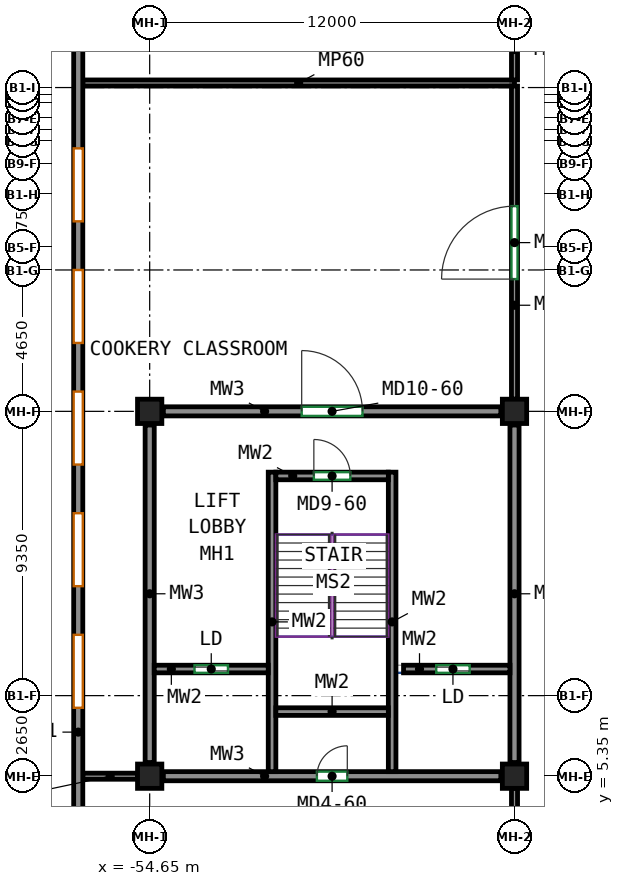
"""IFC4 building model, lengths in metres.
Left out: names, types, materials, properties, quantities, classifications, styles, units other than length and angle.
Written with IfcOpenShell. Run it as: python <this file> out.ifc"""

import sys

from ifc_helpers import new_model, si_unit, direction, frame, frame_2d, origin, origin_2d, place, context, subcontext, project, spatial, rectangle, extrude, source, transform, mapped, element, fill, save


model = new_model("IFC4")
c1 = context("Model", 3, precision=1e-05, world=origin(), true_north=direction((0.0, 1.0)))
c2 = subcontext(c1, "Body", "Model", "MODEL_VIEW")
j1 = project(units=[si_unit("LENGTHUNIT", "METRE"), si_unit("PLANEANGLEUNIT", "RADIAN")], contexts=[c1])
p1 = place(None, origin())
s1 = spatial("IfcSite", under=j1, at=p1, CompositionType="ELEMENT")
p2 = place(p1, origin())
s2 = spatial("IfcBuilding", under=s1, at=p2, CompositionType="ELEMENT")
p3 = place(p2, frame((0.0, 0.0, 13.5)))
s3 = spatial("IfcBuildingStorey", under=s2, at=p3, CompositionType="ELEMENT", Elevation=13.5)
m1 = source(origin(), c2, "Body", "SweptSolid", [
    extrude(rectangle(XDim=0.8, YDim=0.8, at=origin_2d()), origin(), (0.0, 0.0, 1.0), 4.1),
])
for number, where, z_axis, x_axis in (
    (1, (-54.65, 5.35, 0.0), (0.0, 0.0, 1.0), (1.0, 0.0, 0.0)),
    (2, (-54.65, 17.35, 0.0), (0.0, 0.0, 1.0), (1.0, 0.0, 0.0)),
    (3, (-42.65, 5.35, 0.0), (0.0, 0.0, 1.0), (1.0, 0.0, 0.0)),
    (4, (-42.65, 17.35, 0.0), (0.0, 0.0, 1.0), (1.0, 0.0, 0.0)),
):
    element("IfcColumn", number, at=place(p3, frame(where, z_axis=z_axis, x_axis=x_axis)), inside=s3, PredefinedType="COLUMN", context=c2, shape_type="MappedRepresentation", body=[
        mapped(m1, transform((0.0, 0.0, 0.0))),
    ])
m2 = source(origin(), c2, "Body", "SweptSolid", [
    extrude(rectangle(XDim=11.1, YDim=0.3, at=frame_2d((5.55, 0.0))), origin(), (0.0, 0.0, 1.0), 3.3),
])
p4 = place(p3, frame((-54.2, 5.35, 0.0), z_axis=(0.0, 0.0, 1.0), x_axis=(1.0, 0.0, 0.0)))
e5 = element("IfcWall", 5, at=p4, inside=s3, PredefinedType="SHEAR", context=c2, shape_type="MappedRepresentation", body=[
    mapped(m2, transform((0.0, 0.0, 0.0))),
])
p5 = place(p4, frame((5.05, 0.0, 0.0)))
e6 = element("IfcOpeningElement", 6, at=p5, cuts=e5, PredefinedType="OPENING", context=c2, shape_type="SweptSolid", body=[
    extrude(rectangle(XDim=1.0, YDim=2.1, at=frame_2d((0.5, 1.05))), frame((0.0, 0.16, 0.0), z_axis=(0.0, -1.0, 0.0), x_axis=(1.0, 0.0, 0.0)), (0.0, 0.0, 1.0), 0.32),
])
p6 = place(p3, frame((-54.2, 17.35, 0.0), z_axis=(0.0, 0.0, 1.0), x_axis=(1.0, 0.0, 0.0)))
e7 = element("IfcWall", 7, at=p6, inside=s3, PredefinedType="SHEAR", context=c2, shape_type="MappedRepresentation", body=[
    mapped(m2, transform((0.0, 0.0, 0.0))),
])
p7 = place(p6, frame((4.55, 0.0, 0.0)))
e8 = element("IfcOpeningElement", 8, at=p7, cuts=e7, PredefinedType="OPENING", context=c2, shape_type="SweptSolid", body=[
    extrude(rectangle(XDim=2.0, YDim=2.4, at=frame_2d((1.0, 1.2))), frame((0.0, 0.16, 0.0), z_axis=(0.0, -1.0, 0.0), x_axis=(1.0, 0.0, 0.0)), (0.0, 0.0, 1.0), 0.32),
])
for number, where, z_axis, x_axis in (
    (9, (-54.65, 5.8, 0.0), (0.0, 0.0, 1.0), (0.0, 1.0, 0.0)),
    (10, (-42.65, 5.8, 0.0), (0.0, 0.0, 1.0), (0.0, 1.0, 0.0)),
):
    element("IfcWall", number, at=place(p3, frame(where, z_axis=z_axis, x_axis=x_axis)), inside=s3, PredefinedType="SHEAR", context=c2, shape_type="MappedRepresentation", body=[
        mapped(m2, transform((0.0, 0.0, 0.0))),
    ])
m3 = source(origin(), c2, "Body", "SweptSolid", [
    extrude(rectangle(XDim=9.85, YDim=0.25, at=frame_2d((4.925, 0.0))), origin(), (0.0, 0.0, 1.0), 4.1),
])
for number, where, z_axis, x_axis in (
    (11, (-50.625, 5.5, 0.0), (0.0, 0.0, 1.0), (0.0, 1.0, 0.0)),
    (12, (-46.675, 5.5, 0.0), (0.0, 0.0, 1.0), (0.0, 1.0, 0.0)),
):
    element("IfcWall", number, at=place(p3, frame(where, z_axis=z_axis, x_axis=x_axis)), inside=s3, PredefinedType="SHEAR", context=c2, shape_type="MappedRepresentation", body=[
        mapped(m3, transform((0.0, 0.0, 0.0))),
    ])
m4 = source(origin(), c2, "Body", "SweptSolid", [
    extrude(rectangle(XDim=3.7, YDim=0.25, at=frame_2d((1.85, 0.0))), origin(), (0.0, 0.0, 1.0), 4.1),
])
p8 = place(p3, frame((-50.5, 7.475, 0.0), z_axis=(0.0, 0.0, 1.0), x_axis=(1.0, 0.0, 0.0)))
e13 = element("IfcWall", 13, at=p8, inside=s3, PredefinedType="SHEAR", context=c2, shape_type="MappedRepresentation", body=[
    mapped(m4, transform((0.0, 0.0, 0.0))),
])
p9 = place(p3, frame((-50.5, 15.225, 0.0), z_axis=(0.0, 0.0, 1.0), x_axis=(1.0, 0.0, 0.0)))
e14 = element("IfcWall", 14, at=p9, inside=s3, PredefinedType="SHEAR", context=c2, shape_type="MappedRepresentation", body=[
    mapped(m4, transform((0.0, 0.0, 0.0))),
])
p10 = place(p9, frame((1.25, 0.0, 0.0)))
e15 = element("IfcOpeningElement", 15, at=p10, cuts=e14, PredefinedType="OPENING", context=c2, shape_type="SweptSolid", body=[
    extrude(rectangle(XDim=1.2, YDim=2.1, at=frame_2d((0.6, 1.05))), frame((0.0, 0.135, 0.0), z_axis=(0.0, -1.0, 0.0), x_axis=(1.0, 0.0, 0.0)), (0.0, 0.0, 1.0), 0.27),
])
m5 = source(origin(), c2, "Body", "SweptSolid", [
    extrude(rectangle(XDim=3.75, YDim=0.25, at=frame_2d((1.875, 0.0))), origin(), (0.0, 0.0, 1.0), 4.1),
])
p11 = place(p3, frame((-54.5, 8.875, 0.0), z_axis=(0.0, 0.0, 1.0), x_axis=(1.0, 0.0, 0.0)))
e16 = element("IfcWall", 16, at=p11, inside=s3, PredefinedType="SHEAR", context=c2, shape_type="MappedRepresentation", body=[
    mapped(m5, transform((0.0, 0.0, 0.0))),
])
p12 = place(p11, frame((1.325, 0.0, 0.0)))
e17 = element("IfcOpeningElement", 17, at=p12, cuts=e16, PredefinedType="OPENING", context=c2, shape_type="SweptSolid", body=[
    extrude(rectangle(XDim=1.1, YDim=2.1, at=frame_2d((0.55, 1.05))), frame((0.0, 0.135, 0.0), z_axis=(0.0, -1.0, 0.0), x_axis=(1.0, 0.0, 0.0)), (0.0, 0.0, 1.0), 0.27),
])
m6 = source(origin(), c2, "Body", "SweptSolid", [
    extrude(rectangle(XDim=3.5, YDim=0.25, at=frame_2d((1.75, 0.0))), origin(), (0.0, 0.0, 1.0), 4.1),
])
p13 = place(p3, frame((-46.3, 8.875, 0.0), z_axis=(0.0, 0.0, 1.0), x_axis=(1.0, 0.0, 0.0)))
e18 = element("IfcWall", 18, at=p13, inside=s3, PredefinedType="SHEAR", context=c2, shape_type="MappedRepresentation", body=[
    mapped(m6, transform((0.0, 0.0, 0.0))),
])
p14 = place(p13, frame((1.075, 0.0, 0.0)))
e19 = element("IfcOpeningElement", 19, at=p14, cuts=e18, PredefinedType="OPENING", context=c2, shape_type="SweptSolid", body=[
    extrude(rectangle(XDim=1.1, YDim=2.1, at=frame_2d((0.55, 1.05))), frame((0.0, 0.135, 0.0), z_axis=(0.0, -1.0, 0.0), x_axis=(1.0, 0.0, 0.0)), (0.0, 0.0, 1.0), 0.27),
])
m7 = source(origin(), c2, "Body", "SweptSolid", [
    extrude(rectangle(XDim=100.7, YDim=0.3, at=frame_2d((50.35, 0.0))), origin(), (0.0, 0.0, 1.0), 4.1),
])
p15 = place(p3, frame((-57.0, -43.55, 0.0), z_axis=(0.0, 0.0, 1.0), x_axis=(0.0, 1.0, 0.0)))
e20 = element("IfcWall", 20, at=p15, inside=s3, PredefinedType="SOLIDWALL", context=c2, shape_type="MappedRepresentation", body=[
    mapped(m7, transform((0.0, 0.0, 0.0))),
])
p16 = place(p15, frame((3.15, 0.0, 0.9)))
e21 = element("IfcOpeningElement", 21, at=p16, cuts=e20, PredefinedType="OPENING", context=c2, shape_type="SweptSolid", body=[
    extrude(rectangle(XDim=2.4, YDim=1.8, at=frame_2d((1.2, 0.9))), frame((0.0, 0.16, 0.0), z_axis=(0.0, -1.0, 0.0), x_axis=(1.0, 0.0, 0.0)), (0.0, 0.0, 1.0), 0.32),
])
p17 = place(p15, frame((7.15, 0.0, 0.9)))
e22 = element("IfcOpeningElement", 22, at=p17, cuts=e20, PredefinedType="OPENING", context=c2, shape_type="SweptSolid", body=[
    extrude(rectangle(XDim=2.4, YDim=1.8, at=frame_2d((1.2, 0.9))), frame((0.0, 0.16, 0.0), z_axis=(0.0, -1.0, 0.0), x_axis=(1.0, 0.0, 0.0)), (0.0, 0.0, 1.0), 0.32),
])
p18 = place(p15, frame((11.15, 0.0, 0.9)))
e23 = element("IfcOpeningElement", 23, at=p18, cuts=e20, PredefinedType="OPENING", context=c2, shape_type="SweptSolid", body=[
    extrude(rectangle(XDim=2.4, YDim=1.8, at=frame_2d((1.2, 0.9))), frame((0.0, 0.16, 0.0), z_axis=(0.0, -1.0, 0.0), x_axis=(1.0, 0.0, 0.0)), (0.0, 0.0, 1.0), 0.32),
])
p19 = place(p15, frame((19.15, 0.0, 0.9)))
e24 = element("IfcOpeningElement", 24, at=p19, cuts=e20, PredefinedType="OPENING", context=c2, shape_type="SweptSolid", body=[
    extrude(rectangle(XDim=2.4, YDim=1.8, at=frame_2d((1.2, 0.9))), frame((0.0, 0.16, 0.0), z_axis=(0.0, -1.0, 0.0), x_axis=(1.0, 0.0, 0.0)), (0.0, 0.0, 1.0), 0.32),
])
p20 = place(p15, frame((23.15, 0.0, 0.9)))
e25 = element("IfcOpeningElement", 25, at=p20, cuts=e20, PredefinedType="OPENING", context=c2, shape_type="SweptSolid", body=[
    extrude(rectangle(XDim=2.4, YDim=1.8, at=frame_2d((1.2, 0.9))), frame((0.0, 0.16, 0.0), z_axis=(0.0, -1.0, 0.0), x_axis=(1.0, 0.0, 0.0)), (0.0, 0.0, 1.0), 0.32),
])
p21 = place(p15, frame((27.15, 0.0, 0.9)))
e26 = element("IfcOpeningElement", 26, at=p21, cuts=e20, PredefinedType="OPENING", context=c2, shape_type="SweptSolid", body=[
    extrude(rectangle(XDim=2.4, YDim=1.8, at=frame_2d((1.2, 0.9))), frame((0.0, 0.16, 0.0), z_axis=(0.0, -1.0, 0.0), x_axis=(1.0, 0.0, 0.0)), (0.0, 0.0, 1.0), 0.32),
])
p22 = place(p15, frame((31.15, 0.0, 0.9)))
e27 = element("IfcOpeningElement", 27, at=p22, cuts=e20, PredefinedType="OPENING", context=c2, shape_type="SweptSolid", body=[
    extrude(rectangle(XDim=2.4, YDim=1.8, at=frame_2d((1.2, 0.9))), frame((0.0, 0.16, 0.0), z_axis=(0.0, -1.0, 0.0), x_axis=(1.0, 0.0, 0.0)), (0.0, 0.0, 1.0), 0.32),
])
p23 = place(p15, frame((39.15, 0.0, 0.9)))
e28 = element("IfcOpeningElement", 28, at=p23, cuts=e20, PredefinedType="OPENING", context=c2, shape_type="SweptSolid", body=[
    extrude(rectangle(XDim=2.4, YDim=1.8, at=frame_2d((1.2, 0.9))), frame((0.0, 0.16, 0.0), z_axis=(0.0, -1.0, 0.0), x_axis=(1.0, 0.0, 0.0)), (0.0, 0.0, 1.0), 0.32),
])
p24 = place(p15, frame((43.15, 0.0, 0.9)))
e29 = element("IfcOpeningElement", 29, at=p24, cuts=e20, PredefinedType="OPENING", context=c2, shape_type="SweptSolid", body=[
    extrude(rectangle(XDim=2.4, YDim=1.8, at=frame_2d((1.2, 0.9))), frame((0.0, 0.16, 0.0), z_axis=(0.0, -1.0, 0.0), x_axis=(1.0, 0.0, 0.0)), (0.0, 0.0, 1.0), 0.32),
])
p25 = place(p15, frame((51.15, 0.0, 0.9)))
e30 = element("IfcOpeningElement", 30, at=p25, cuts=e20, PredefinedType="OPENING", context=c2, shape_type="SweptSolid", body=[
    extrude(rectangle(XDim=2.4, YDim=1.8, at=frame_2d((1.2, 0.9))), frame((0.0, 0.16, 0.0), z_axis=(0.0, -1.0, 0.0), x_axis=(1.0, 0.0, 0.0)), (0.0, 0.0, 1.0), 0.32),
])
p26 = place(p15, frame((55.15, 0.0, 0.9)))
e31 = element("IfcOpeningElement", 31, at=p26, cuts=e20, PredefinedType="OPENING", context=c2, shape_type="SweptSolid", body=[
    extrude(rectangle(XDim=2.4, YDim=1.8, at=frame_2d((1.2, 0.9))), frame((0.0, 0.16, 0.0), z_axis=(0.0, -1.0, 0.0), x_axis=(1.0, 0.0, 0.0)), (0.0, 0.0, 1.0), 0.32),
])
p27 = place(p15, frame((59.15, 0.0, 0.9)))
e32 = element("IfcOpeningElement", 32, at=p27, cuts=e20, PredefinedType="OPENING", context=c2, shape_type="SweptSolid", body=[
    extrude(rectangle(XDim=2.4, YDim=1.8, at=frame_2d((1.2, 0.9))), frame((0.0, 0.16, 0.0), z_axis=(0.0, -1.0, 0.0), x_axis=(1.0, 0.0, 0.0)), (0.0, 0.0, 1.0), 0.32),
])
p28 = place(p15, frame((63.15, 0.0, 0.9)))
e33 = element("IfcOpeningElement", 33, at=p28, cuts=e20, PredefinedType="OPENING", context=c2, shape_type="SweptSolid", body=[
    extrude(rectangle(XDim=2.4, YDim=1.8, at=frame_2d((1.2, 0.9))), frame((0.0, 0.16, 0.0), z_axis=(0.0, -1.0, 0.0), x_axis=(1.0, 0.0, 0.0)), (0.0, 0.0, 1.0), 0.32),
])
p29 = place(p15, frame((67.15, 0.0, 0.9)))
e34 = element("IfcOpeningElement", 34, at=p29, cuts=e20, PredefinedType="OPENING", context=c2, shape_type="SweptSolid", body=[
    extrude(rectangle(XDim=2.4, YDim=1.8, at=frame_2d((1.2, 0.9))), frame((0.0, 0.16, 0.0), z_axis=(0.0, -1.0, 0.0), x_axis=(1.0, 0.0, 0.0)), (0.0, 0.0, 1.0), 0.32),
])
p30 = place(p15, frame((75.15, 0.0, 0.9)))
e35 = element("IfcOpeningElement", 35, at=p30, cuts=e20, PredefinedType="OPENING", context=c2, shape_type="SweptSolid", body=[
    extrude(rectangle(XDim=2.4, YDim=1.8, at=frame_2d((1.2, 0.9))), frame((0.0, 0.16, 0.0), z_axis=(0.0, -1.0, 0.0), x_axis=(1.0, 0.0, 0.0)), (0.0, 0.0, 1.0), 0.32),
])
p31 = place(p15, frame((79.15, 0.0, 0.9)))
e36 = element("IfcOpeningElement", 36, at=p31, cuts=e20, PredefinedType="OPENING", context=c2, shape_type="SweptSolid", body=[
    extrude(rectangle(XDim=2.4, YDim=1.8, at=frame_2d((1.2, 0.9))), frame((0.0, 0.16, 0.0), z_axis=(0.0, -1.0, 0.0), x_axis=(1.0, 0.0, 0.0)), (0.0, 0.0, 1.0), 0.32),
])
p32 = place(p15, frame((83.15, 0.0, 0.9)))
e37 = element("IfcOpeningElement", 37, at=p32, cuts=e20, PredefinedType="OPENING", context=c2, shape_type="SweptSolid", body=[
    extrude(rectangle(XDim=2.4, YDim=1.8, at=frame_2d((1.2, 0.9))), frame((0.0, 0.16, 0.0), z_axis=(0.0, -1.0, 0.0), x_axis=(1.0, 0.0, 0.0)), (0.0, 0.0, 1.0), 0.32),
])
p33 = place(p15, frame((87.15, 0.0, 0.9)))
e38 = element("IfcOpeningElement", 38, at=p33, cuts=e20, PredefinedType="OPENING", context=c2, shape_type="SweptSolid", body=[
    extrude(rectangle(XDim=2.4, YDim=1.8, at=frame_2d((1.2, 0.9))), frame((0.0, 0.16, 0.0), z_axis=(0.0, -1.0, 0.0), x_axis=(1.0, 0.0, 0.0)), (0.0, 0.0, 1.0), 0.32),
])
p34 = place(p15, frame((91.15, 0.0, 0.9)))
e39 = element("IfcOpeningElement", 39, at=p34, cuts=e20, PredefinedType="OPENING", context=c2, shape_type="SweptSolid", body=[
    extrude(rectangle(XDim=2.4, YDim=1.8, at=frame_2d((1.2, 0.9))), frame((0.0, 0.16, 0.0), z_axis=(0.0, -1.0, 0.0), x_axis=(1.0, 0.0, 0.0)), (0.0, 0.0, 1.0), 0.32),
])
p35 = place(p15, frame((95.15, 0.0, 0.9)))
e40 = element("IfcOpeningElement", 40, at=p35, cuts=e20, PredefinedType="OPENING", context=c2, shape_type="SweptSolid", body=[
    extrude(rectangle(XDim=2.4, YDim=1.8, at=frame_2d((1.2, 0.9))), frame((0.0, 0.16, 0.0), z_axis=(0.0, -1.0, 0.0), x_axis=(1.0, 0.0, 0.0)), (0.0, 0.0, 1.0), 0.32),
])
m8 = source(origin(), c2, "Body", "SweptSolid", [
    extrude(rectangle(XDim=1.8, YDim=0.2, at=frame_2d((0.9, 0.0))), origin(), (0.0, 0.0, 1.0), 4.1),
])
p36 = place(p3, frame((-56.85, 5.35, 0.0), z_axis=(0.0, 0.0, 1.0), x_axis=(1.0, 0.0, 0.0)))
e41 = element("IfcWall", 41, at=p36, inside=s3, PredefinedType="PARTITIONING", context=c2, shape_type="MappedRepresentation", body=[
    mapped(m8, transform((0.0, 0.0, 0.0))),
])
m9 = source(origin(), c2, "Body", "SweptSolid", [
    extrude(rectangle(XDim=14.2, YDim=0.2, at=frame_2d((7.1, 0.0))), origin(), (0.0, 0.0, 1.0), 3.3),
])
p37 = place(p3, frame((-56.85, 28.15, 0.0), z_axis=(0.0, 0.0, 1.0), x_axis=(1.0, 0.0, 0.0)))
e42 = element("IfcWall", 42, at=p37, inside=s3, PredefinedType="PARTITIONING", context=c2, shape_type="MappedRepresentation", body=[
    mapped(m9, transform((0.0, 0.0, 0.0))),
])
m10 = source(origin(), c2, "Body", "SweptSolid", [
    extrude(rectangle(XDim=11.2, YDim=0.2, at=frame_2d((5.6, 0.0))), origin(), (0.0, 0.0, 1.0), 3.3),
])
p38 = place(p3, frame((-42.65, -6.25, 0.0), z_axis=(0.0, 0.0, 1.0), x_axis=(0.0, 1.0, 0.0)))
e43 = element("IfcWall", 43, at=p38, inside=s3, PredefinedType="PARTITIONING", context=c2, shape_type="MappedRepresentation", body=[
    mapped(m10, transform((0.0, 0.0, 0.0))),
])
p39 = place(p38, frame((5.0, 0.0, 0.0)))
e44 = element("IfcOpeningElement", 44, at=p39, cuts=e43, PredefinedType="OPENING", context=c2, shape_type="SweptSolid", body=[
    extrude(rectangle(XDim=1.2, YDim=2.1, at=frame_2d((0.6, 1.05))), frame((0.0, 0.11, 0.0), z_axis=(0.0, -1.0, 0.0), x_axis=(1.0, 0.0, 0.0)), (0.0, 0.0, 1.0), 0.22),
])
m11 = source(origin(), c2, "Body", "SweptSolid", [
    extrude(rectangle(XDim=10.3, YDim=0.2, at=frame_2d((5.15, 0.0))), origin(), (0.0, 0.0, 1.0), 3.3),
])
p40 = place(p3, frame((-42.65, 17.75, 0.0), z_axis=(0.0, 0.0, 1.0), x_axis=(0.0, 1.0, 0.0)))
e45 = element("IfcWall", 45, at=p40, inside=s3, PredefinedType="PARTITIONING", context=c2, shape_type="MappedRepresentation", body=[
    mapped(m11, transform((0.0, 0.0, 0.0))),
])
p41 = place(p40, frame((3.95, 0.0, 0.0)))
e46 = element("IfcOpeningElement", 46, at=p41, cuts=e45, PredefinedType="OPENING", context=c2, shape_type="SweptSolid", body=[
    extrude(rectangle(XDim=2.4, YDim=2.4, at=frame_2d((1.2, 1.2))), frame((0.0, 0.11, 0.0), z_axis=(0.0, -1.0, 0.0), x_axis=(1.0, 0.0, 0.0)), (0.0, 0.0, 1.0), 0.22),
])
m12 = source(origin(), c2, "Body", "SweptSolid", [
    extrude(rectangle(XDim=2.0, YDim=0.2, at=frame_2d((1.0, 0.0))), origin(), (0.0, 0.0, 1.0), 3.3),
])
p42 = place(p3, frame((-42.65, 28.25, 0.0), z_axis=(0.0, 0.0, 1.0), x_axis=(0.0, 1.0, 0.0)))
e47 = element("IfcWall", 47, at=p42, inside=s3, PredefinedType="PARTITIONING", context=c2, shape_type="MappedRepresentation", body=[
    mapped(m12, transform((0.0, 0.0, 0.0))),
])
p43 = place(p25, origin())
e48 = element("IfcWindow", 48, at=p43, inside=s3, PartitioningType="SINGLE_PANEL", PredefinedType="WINDOW", context=c2, shape_type="SweptSolid", body=[
    extrude(rectangle(XDim=2.4, YDim=1.8, at=frame_2d((1.2, 0.9))), frame((0.0, 0.03, 0.0), z_axis=(0.0, -1.0, 0.0), x_axis=(1.0, 0.0, 0.0)), (0.0, 0.0, 1.0), 0.06),
])
fill(e30, e48)
p44 = place(p26, origin())
e49 = element("IfcWindow", 49, at=p44, inside=s3, PartitioningType="SINGLE_PANEL", PredefinedType="WINDOW", context=c2, shape_type="SweptSolid", body=[
    extrude(rectangle(XDim=2.4, YDim=1.8, at=frame_2d((1.2, 0.9))), frame((0.0, 0.03, 0.0), z_axis=(0.0, -1.0, 0.0), x_axis=(1.0, 0.0, 0.0)), (0.0, 0.0, 1.0), 0.06),
])
fill(e31, e49)
p45 = place(p27, origin())
e50 = element("IfcWindow", 50, at=p45, inside=s3, PartitioningType="SINGLE_PANEL", PredefinedType="WINDOW", context=c2, shape_type="SweptSolid", body=[
    extrude(rectangle(XDim=2.4, YDim=1.8, at=frame_2d((1.2, 0.9))), frame((0.0, 0.03, 0.0), z_axis=(0.0, -1.0, 0.0), x_axis=(1.0, 0.0, 0.0)), (0.0, 0.0, 1.0), 0.06),
])
fill(e32, e50)
p46 = place(p28, origin())
e51 = element("IfcWindow", 51, at=p46, inside=s3, PartitioningType="SINGLE_PANEL", PredefinedType="WINDOW", context=c2, shape_type="SweptSolid", body=[
    extrude(rectangle(XDim=2.4, YDim=1.8, at=frame_2d((1.2, 0.9))), frame((0.0, 0.03, 0.0), z_axis=(0.0, -1.0, 0.0), x_axis=(1.0, 0.0, 0.0)), (0.0, 0.0, 1.0), 0.06),
])
fill(e33, e51)
p47 = place(p29, origin())
e52 = element("IfcWindow", 52, at=p47, inside=s3, PartitioningType="SINGLE_PANEL", PredefinedType="WINDOW", context=c2, shape_type="SweptSolid", body=[
    extrude(rectangle(XDim=2.4, YDim=1.8, at=frame_2d((1.2, 0.9))), frame((0.0, 0.03, 0.0), z_axis=(0.0, -1.0, 0.0), x_axis=(1.0, 0.0, 0.0)), (0.0, 0.0, 1.0), 0.06),
])
fill(e34, e52)
p48 = place(p10, origin())
e53 = element("IfcDoor", 53, at=p48, inside=s3, OperationType="DOUBLE_DOOR_SINGLE_SWING", PredefinedType="DOOR", context=c2, shape_type="SweptSolid", body=[
    extrude(rectangle(XDim=1.2, YDim=2.1, at=frame_2d((0.6, 1.05))), frame((0.0, 0.025, 0.0), z_axis=(0.0, -1.0, 0.0), x_axis=(1.0, 0.0, 0.0)), (0.0, 0.0, 1.0), 0.05),
])
fill(e15, e53)
p49 = place(p7, origin())
e54 = element("IfcDoor", 54, at=p49, inside=s3, OperationType="DOUBLE_DOOR_SINGLE_SWING", PredefinedType="DOOR", context=c2, shape_type="SweptSolid", body=[
    extrude(rectangle(XDim=2.0, YDim=2.4, at=frame_2d((1.0, 1.2))), frame((0.0, 0.025, 0.0), z_axis=(0.0, -1.0, 0.0), x_axis=(1.0, 0.0, 0.0)), (0.0, 0.0, 1.0), 0.05),
])
fill(e8, e54)
p50 = place(p12, origin())
e55 = element("IfcDoor", 55, at=p50, inside=s3, OperationType="SLIDING_TO_LEFT", PredefinedType="DOOR", context=c2, shape_type="SweptSolid", body=[
    extrude(rectangle(XDim=1.1, YDim=2.1, at=frame_2d((0.55, 1.05))), frame((0.0, 0.025, 0.0), z_axis=(0.0, -1.0, 0.0), x_axis=(1.0, 0.0, 0.0)), (0.0, 0.0, 1.0), 0.05),
])
fill(e17, e55)
p51 = place(p14, origin())
e56 = element("IfcDoor", 56, at=p51, inside=s3, OperationType="SLIDING_TO_LEFT", PredefinedType="DOOR", context=c2, shape_type="SweptSolid", body=[
    extrude(rectangle(XDim=1.1, YDim=2.1, at=frame_2d((0.55, 1.05))), frame((0.0, 0.025, 0.0), z_axis=(0.0, -1.0, 0.0), x_axis=(1.0, 0.0, 0.0)), (0.0, 0.0, 1.0), 0.05),
])
fill(e19, e56)
p52 = place(p5, origin())
e57 = element("IfcDoor", 57, at=p52, inside=s3, OperationType="SINGLE_SWING_RIGHT", PredefinedType="DOOR", context=c2, shape_type="SweptSolid", body=[
    extrude(rectangle(XDim=1.0, YDim=2.1, at=frame_2d((0.5, 1.05))), frame((0.0, 0.025, 0.0), z_axis=(0.0, -1.0, 0.0), x_axis=(1.0, 0.0, 0.0)), (0.0, 0.0, 1.0), 0.05),
])
fill(e6, e57)
p53 = place(p41, origin())
e58 = element("IfcDoor", 58, at=p53, inside=s3, OperationType="DOUBLE_DOOR_SINGLE_SWING", PredefinedType="DOOR", context=c2, shape_type="SweptSolid", body=[
    extrude(rectangle(XDim=2.4, YDim=2.4, at=frame_2d((1.2, 1.2))), frame((0.0, 0.025, 0.0), z_axis=(0.0, -1.0, 0.0), x_axis=(1.0, 0.0, 0.0)), (0.0, 0.0, 1.0), 0.05),
])
fill(e46, e58)
save(model, sys.argv[1])
